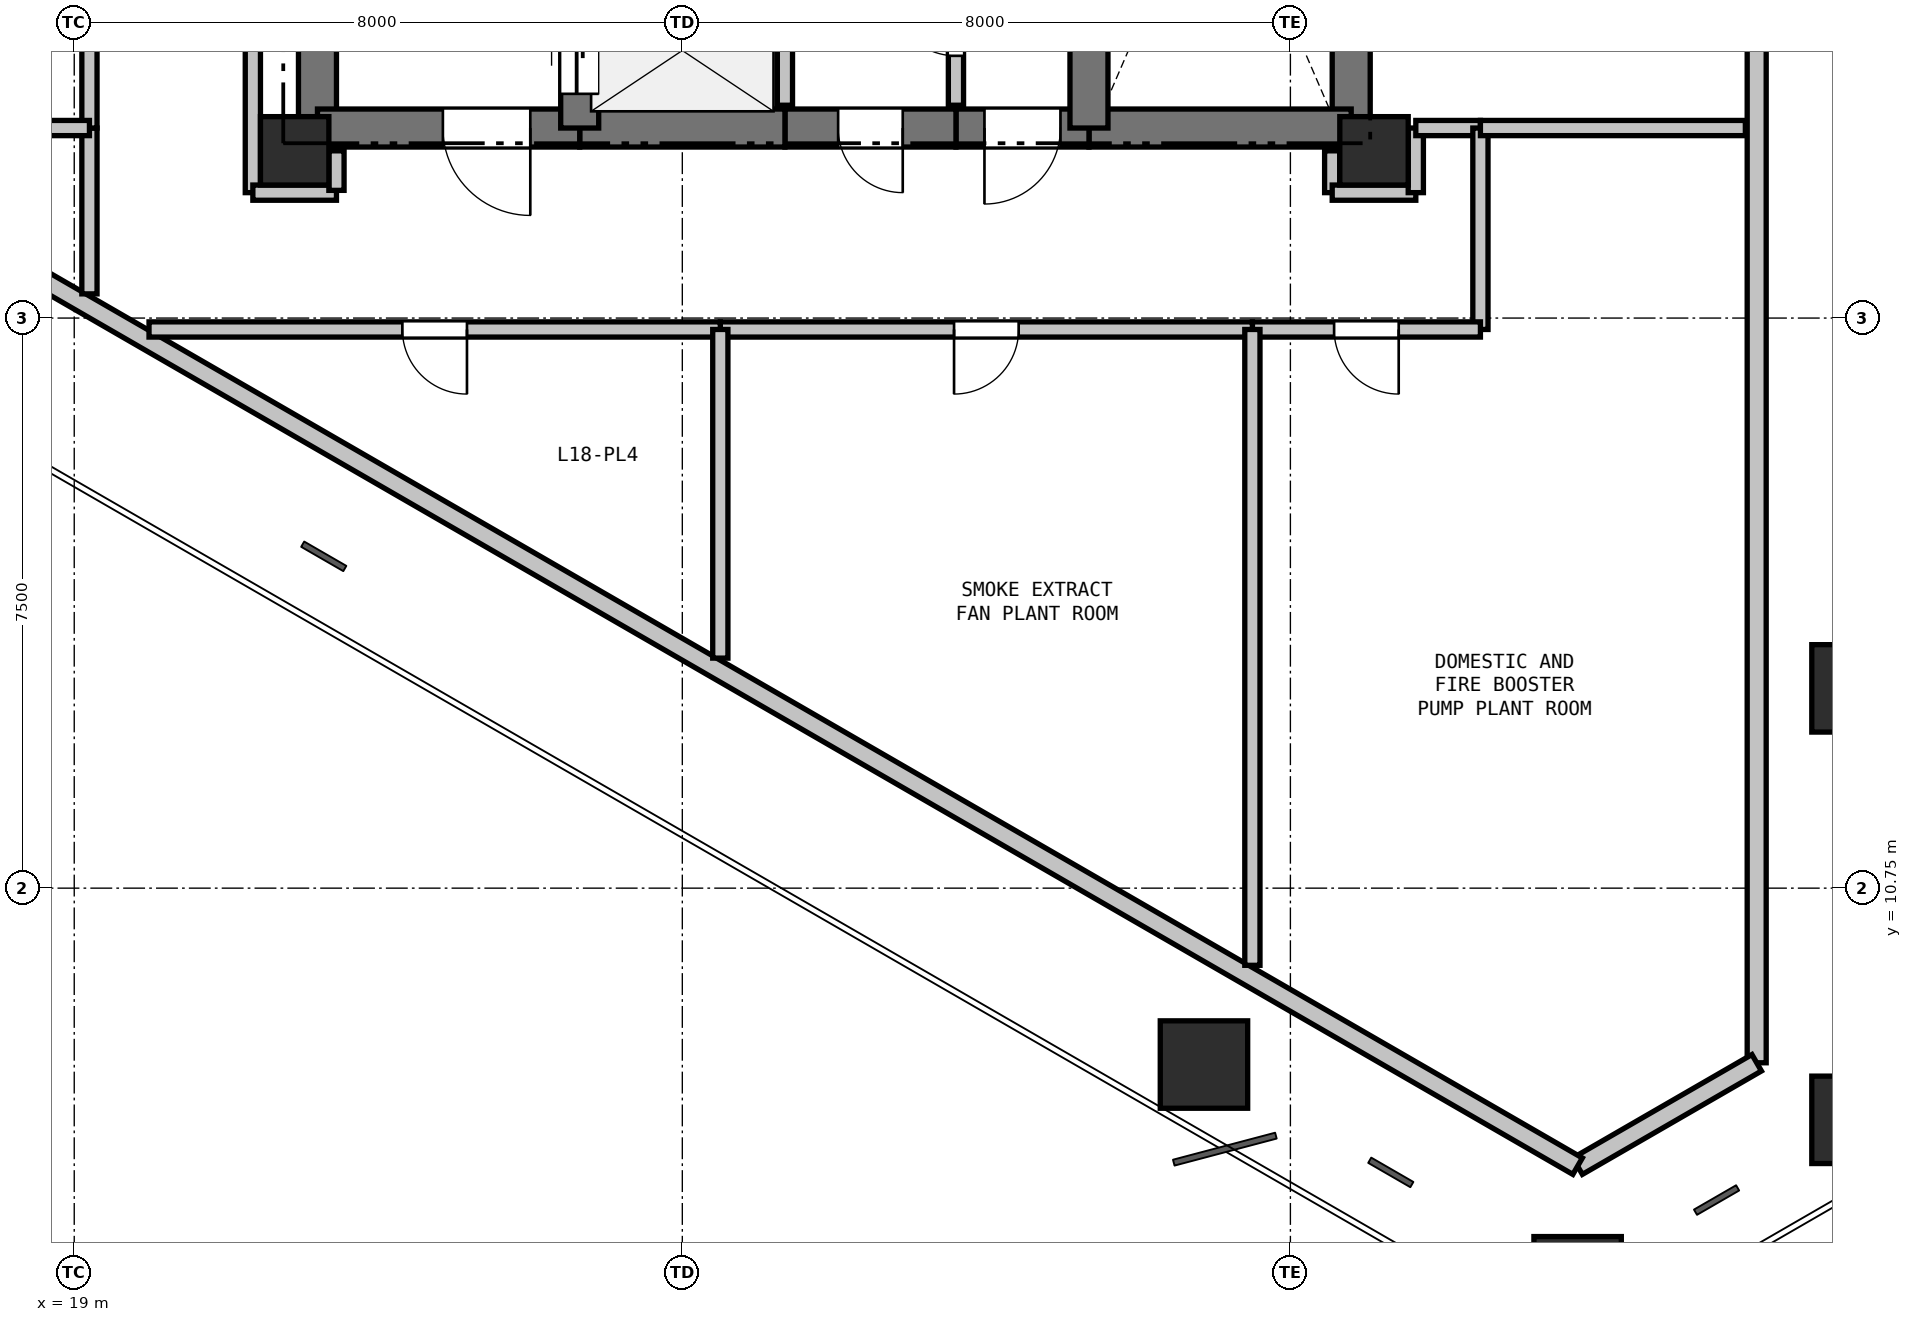
"""IFC4 building model, lengths in metres.
Left out: names, types, materials, properties, quantities, classifications, styles, units other than length and angle.
Written with IfcOpenShell. Run it as: python <this file> out.ifc"""

import sys

from ifc_helpers import new_model, si_unit, direction, frame, frame_2d, origin, origin_2d, place, context, subcontext, project, spatial, rectangle, hollow_rectangle, extrude, element, fill, save


model = new_model("IFC4")
c1 = context("Model", 3, precision=1e-05, world=origin(), true_north=direction((0.0, 1.0)))
c2 = subcontext(c1, "Body", "Model", "MODEL_VIEW")
j1 = project(units=[si_unit("LENGTHUNIT", "METRE"), si_unit("PLANEANGLEUNIT", "RADIAN")], contexts=[c1])
p1 = place(None, origin())
s1 = spatial("IfcSite", under=j1, at=p1, CompositionType="ELEMENT")
p2 = place(p1, origin())
s2 = spatial("IfcBuilding", under=s1, at=p2, CompositionType="ELEMENT")
p3 = place(p2, frame((0.0, 0.0, 66.9)))
s3 = spatial("IfcBuildingStorey", under=s2, at=p3, CompositionType="ELEMENT", Elevation=66.9)
for number, where, z_axis, x_axis in (
    (1, (21.9, 20.45, 0.0), (0.0, 0.0, 1.0), (1.0, 0.0, 0.0)),
    (2, (36.1, 20.45, 0.0), (0.0, 0.0, 1.0), (1.0, 0.0, 0.0)),
):
    element("IfcColumn", number, at=place(p3, frame(where, z_axis=z_axis, x_axis=x_axis)), inside=s3, PredefinedType="COLUMN", context=c2, shape_type="SweptSolid", body=[
        extrude(rectangle(XDim=0.9, YDim=0.9, at=origin_2d()), origin(), (0.0, 0.0, 1.0), 6.6),
    ])
for number, where, z_axis, x_axis in (
    (3, (42.435, 13.378, -0.32), (0.0, 0.0, 1.0), (1.0, 0.0, 0.0)),
    (4, (42.435, 7.702, -0.32), (0.0, 0.0, 1.0), (1.0, 0.0, 0.0)),
    (5, (38.779, 5.591, -0.32), (0.0, 0.0, 1.0), (1.0, 0.0, 0.0)),
    (6, (33.863, 8.429, -0.32), (0.0, 0.0, 1.0), (1.0, 0.0, 0.0)),
):
    element("IfcColumn", number, at=place(p3, frame(where, z_axis=z_axis, x_axis=x_axis)), inside=s3, PredefinedType="COLUMN", context=c2, shape_type="SweptSolid", body=[
        extrude(hollow_rectangle(XDim=1.15, YDim=1.15, WallThickness=0.032, at=origin_2d()), origin(), (0.0, 0.0, 1.0), 6.92),
    ])
p4 = place(p3, frame((41.135, 45.047, 0.0), z_axis=(0.0, 0.0, 1.0), x_axis=(0.0, -1.0, 0.0)))
e7 = element("IfcWall", 7, at=p4, inside=s3, PredefinedType="SOLIDWALL", context=c2, shape_type="SweptSolid", body=[
    extrude(rectangle(XDim=36.595, YDim=0.25, at=frame_2d((18.297, 0.0))), origin(), (0.0, 0.0, 1.0), 5.723),
])
p5 = place(p3, frame((41.135, 8.453, 0.0), z_axis=(0.0, 0.0, 1.0), x_axis=(-0.865980815662, -0.500077220942, 0.0)))
e8 = element("IfcWall", 8, at=p5, inside=s3, PredefinedType="SOLIDWALL", context=c2, shape_type="SweptSolid", body=[
    extrude(rectangle(XDim=2.72, YDim=0.25, at=frame_2d((1.36, 0.0))), origin(), (0.0, 0.0, 1.0), 6.35),
])
p6 = place(p3, frame((38.779, 7.092, 0.0), z_axis=(0.0, 0.0, 1.0), x_axis=(-0.866023716119, 0.500002923111, 0.0)))
e9 = element("IfcWall", 9, at=p6, inside=s3, PredefinedType="SOLIDWALL", context=c2, shape_type="SweptSolid", body=[
    extrude(rectangle(XDim=36.595, YDim=0.25, at=frame_2d((18.297, 0.0))), origin(), (0.0, 0.0, 1.0), 5.723),
])
p7 = place(p3, frame((22.2, 20.75, 0.0), z_axis=(0.0, 0.0, 1.0), x_axis=(0.0, 1.0, 0.0)))
e10 = element("IfcWall", 10, at=p7, inside=s3, PredefinedType="SHEAR", context=c2, shape_type="SweptSolid", body=[
    extrude(rectangle(XDim=4.65, YDim=0.5, at=frame_2d((2.325, 0.0))), origin(), (0.0, 0.0, 1.0), 6.35),
])
p8 = place(p3, frame((35.8, 28.1, 0.0), z_axis=(0.0, 0.0, 1.0), x_axis=(0.0, -1.0, 0.0)))
e11 = element("IfcWall", 11, at=p8, inside=s3, PredefinedType="SHEAR", context=c2, shape_type="SweptSolid", body=[
    extrude(rectangle(XDim=7.35, YDim=0.5, at=frame_2d((3.675, 0.0))), origin(), (0.0, 0.0, 1.0), 6.35),
])
p9 = place(p3, frame((35.8, 20.75, 0.0), z_axis=(0.0, 0.0, 1.0), x_axis=(-1.0, 0.0, 0.0)))
e12 = element("IfcWall", 12, at=p9, inside=s3, PredefinedType="SHEAR", context=c2, shape_type="SweptSolid", body=[
    extrude(rectangle(XDim=3.45, YDim=0.5, at=frame_2d((1.725, 0.0))), origin(), (0.0, 0.0, 1.0), 6.35),
])
p10 = place(p3, frame((32.35, 20.75, 0.0), z_axis=(0.0, 0.0, 1.0), x_axis=(-1.0, 0.0, 0.0)))
e13 = element("IfcWall", 13, at=p10, inside=s3, PredefinedType="SHEAR", context=c2, shape_type="SweptSolid", body=[
    extrude(rectangle(XDim=1.75, YDim=0.5, at=frame_2d((0.875, 0.0))), origin(), (0.0, 0.0, 1.0), 6.35),
])
p11 = place(p10, frame((0.375, 0.0, 0.0)))
e14 = element("IfcOpeningElement", 14, at=p11, cuts=e13, PredefinedType="OPENING", context=c2, shape_type="SweptSolid", body=[
    extrude(rectangle(XDim=1.0, YDim=2.15, at=frame_2d((0.5, 1.075))), frame((0.0, 0.26, 0.0), z_axis=(0.0, -1.0, 0.0), x_axis=(1.0, 0.0, 0.0)), (0.0, 0.0, 1.0), 0.52),
])
p12 = place(p3, frame((30.6, 20.75, 0.0), z_axis=(0.0, 0.0, 1.0), x_axis=(-1.0, 0.0, 0.0)))
e15 = element("IfcWall", 15, at=p12, inside=s3, PredefinedType="SHEAR", context=c2, shape_type="SweptSolid", body=[
    extrude(rectangle(XDim=2.25, YDim=0.5, at=frame_2d((1.125, 0.0))), origin(), (0.0, 0.0, 1.0), 6.35),
])
p13 = place(p12, frame((0.7, 0.0, 0.0)))
e16 = element("IfcOpeningElement", 16, at=p13, cuts=e15, PredefinedType="OPENING", context=c2, shape_type="SweptSolid", body=[
    extrude(rectangle(XDim=0.85, YDim=2.1, at=frame_2d((0.425, 1.05))), frame((0.0, 0.26, 0.0), z_axis=(0.0, -1.0, 0.0), x_axis=(1.0, 0.0, 0.0)), (0.0, 0.0, 1.0), 0.52),
])
p14 = place(p3, frame((28.35, 20.75, 0.0), z_axis=(0.0, 0.0, 1.0), x_axis=(-1.0, 0.0, 0.0)))
e17 = element("IfcWall", 17, at=p14, inside=s3, PredefinedType="SHEAR", context=c2, shape_type="SweptSolid", body=[
    extrude(rectangle(XDim=2.7, YDim=0.5, at=frame_2d((1.35, 0.0))), origin(), (0.0, 0.0, 1.0), 6.35),
])
p15 = place(p3, frame((25.65, 20.75, 0.0), z_axis=(0.0, 0.0, 1.0), x_axis=(-1.0, 0.0, 0.0)))
e18 = element("IfcWall", 18, at=p15, inside=s3, PredefinedType="SHEAR", context=c2, shape_type="SweptSolid", body=[
    extrude(rectangle(XDim=3.45, YDim=0.5, at=frame_2d((1.725, 0.0))), origin(), (0.0, 0.0, 1.0), 6.35),
])
p16 = place(p15, frame((0.65, 0.0, 0.0)))
e19 = element("IfcOpeningElement", 19, at=p16, cuts=e18, PredefinedType="OPENING", context=c2, shape_type="SweptSolid", body=[
    extrude(rectangle(XDim=1.15, YDim=2.15, at=frame_2d((0.575, 1.075))), frame((0.0, 0.26, 0.0), z_axis=(0.0, -1.0, 0.0), x_axis=(1.0, 0.0, 0.0)), (0.0, 0.0, 1.0), 0.52),
])
p17 = place(p3, frame((25.65, 20.75, 0.0), z_axis=(0.0, 0.0, 1.0), x_axis=(0.0, 1.0, 0.0)))
e20 = element("IfcWall", 20, at=p17, inside=s3, PredefinedType="SHEAR", context=c2, shape_type="SweptSolid", body=[
    extrude(rectangle(XDim=2.0, YDim=0.5, at=frame_2d((1.0, 0.0))), origin(), (0.0, 0.0, 1.0), 6.35),
])
p18 = place(p17, frame((0.45, 0.0, 0.0)))
e21 = element("IfcOpeningElement", 21, at=p18, cuts=e20, PredefinedType="OPENING", context=c2, shape_type="SweptSolid", body=[
    extrude(rectangle(XDim=1.1, YDim=2.15, at=frame_2d((0.55, 1.075))), frame((0.0, 0.26, 0.0), z_axis=(0.0, -1.0, 0.0), x_axis=(1.0, 0.0, 0.0)), (0.0, 0.0, 1.0), 0.52),
])
p19 = place(p3, frame((32.35, 20.75, 0.0), z_axis=(0.0, 0.0, 1.0), x_axis=(0.0, 1.0, 0.0)))
e22 = element("IfcWall", 22, at=p19, inside=s3, PredefinedType="SHEAR", context=c2, shape_type="SweptSolid", body=[
    extrude(rectangle(XDim=4.8, YDim=0.5, at=frame_2d((2.4, 0.0))), origin(), (0.0, 0.0, 1.0), 6.35),
])
p20 = place(p3, frame((28.35, 23.2, 0.0), z_axis=(0.0, 0.0, 1.0), x_axis=(0.0, -1.0, 0.0)))
e23 = element("IfcWall", 23, at=p20, inside=s3, PredefinedType="PARTITIONING", context=c2, shape_type="SweptSolid", body=[
    extrude(rectangle(XDim=2.15, YDim=0.2, at=frame_2d((1.075, 0.0))), origin(), (0.0, 0.0, 1.0), 6.35),
])
p21 = place(p3, frame((30.6, 21.05, 0.0), z_axis=(0.0, 0.0, 1.0), x_axis=(0.0, 1.0, 0.0)))
e24 = element("IfcWall", 24, at=p21, inside=s3, PredefinedType="PARTITIONING", context=c2, shape_type="SweptSolid", body=[
    extrude(rectangle(XDim=2.15, YDim=0.2, at=frame_2d((1.075, 0.0))), origin(), (0.0, 0.0, 1.0), 6.35),
])
p22 = place(p21, frame((0.65, 0.0, 0.0)))
e25 = element("IfcOpeningElement", 25, at=p22, cuts=e24, PredefinedType="OPENING", context=c2, shape_type="SweptSolid", body=[
    extrude(rectangle(XDim=0.85, YDim=2.1, at=frame_2d((0.425, 1.05))), frame((0.0, 0.11, 0.0), z_axis=(0.0, -1.0, 0.0), x_axis=(1.0, 0.0, 0.0)), (0.0, 0.0, 1.0), 0.22),
])
p23 = place(p3, frame((21.35, 33.6, 0.0), z_axis=(0.0, 0.0, 1.0), x_axis=(0.0, -1.0, 0.0)))
e26 = element("IfcWall", 26, at=p23, inside=s3, PredefinedType="PARTITIONING", context=c2, shape_type="SweptSolid", body=[
    extrude(rectangle(XDim=13.7, YDim=0.2, at=frame_2d((6.85, 0.0))), origin(), (0.0, 0.0, 1.0), 5.723),
])
p24 = place(p3, frame((21.35, 19.9, 0.0), z_axis=(0.0, 0.0, 1.0), x_axis=(1.0, 0.0, 0.0)))
e27 = element("IfcWall", 27, at=p24, inside=s3, PredefinedType="PARTITIONING", context=c2, shape_type="SweptSolid", body=[
    extrude(rectangle(XDim=1.1, YDim=0.2, at=frame_2d((0.55, 0.0))), origin(), (0.0, 0.0, 1.0), 5.723),
])
p25 = place(p3, frame((22.45, 19.93, 0.0), z_axis=(0.0, 0.0, 1.0), x_axis=(0.0, 1.0, 0.0)))
e28 = element("IfcWall", 28, at=p25, inside=s3, PredefinedType="PARTITIONING", context=c2, shape_type="SweptSolid", body=[
    extrude(rectangle(XDim=0.52, YDim=0.2, at=frame_2d((0.26, 0.0))), origin(), (0.0, 0.0, 1.0), 5.723),
])
p26 = place(p3, frame((35.55, 20.45, 0.0), z_axis=(0.0, 0.0, 1.0), x_axis=(0.0, -1.0, 0.0)))
e29 = element("IfcWall", 29, at=p26, inside=s3, PredefinedType="PARTITIONING", context=c2, shape_type="SweptSolid", body=[
    extrude(rectangle(XDim=0.55, YDim=0.2, at=frame_2d((0.275, 0.0))), origin(), (0.0, 0.0, 1.0), 5.798),
])
p27 = place(p3, frame((35.55, 19.9, 0.0), z_axis=(0.0, 0.0, 1.0), x_axis=(1.0, 0.0, 0.0)))
e30 = element("IfcWall", 30, at=p27, inside=s3, PredefinedType="PARTITIONING", context=c2, shape_type="SweptSolid", body=[
    extrude(rectangle(XDim=1.1, YDim=0.2, at=frame_2d((0.55, 0.0))), origin(), (0.0, 0.0, 1.0), 5.723),
])
for number, where, z_axis, x_axis in (
    (31, (36.65, 19.9, 0.0), (0.0, 0.0, 1.0), (0.0, 1.0, 0.0)),
    (32, (36.65, 20.75, 0.0), (0.0, 0.0, 1.0), (1.0, 0.0, 0.0)),
):
    element("IfcWall", number, at=place(p3, frame(where, z_axis=z_axis, x_axis=x_axis)), inside=s3, PredefinedType="PARTITIONING", context=c2, shape_type="SweptSolid", body=[
        extrude(rectangle(XDim=0.85, YDim=0.2, at=frame_2d((0.425, 0.0))), origin(), (0.0, 0.0, 1.0), 6.35),
    ])
p28 = place(p3, frame((37.5, 20.75, 0.0), z_axis=(0.0, 0.0, 1.0), x_axis=(0.0, -1.0, 0.0)))
e33 = element("IfcWall", 33, at=p28, inside=s3, PredefinedType="PARTITIONING", context=c2, shape_type="SweptSolid", body=[
    extrude(rectangle(XDim=2.65, YDim=0.2, at=frame_2d((1.325, 0.0))), origin(), (0.0, 0.0, 1.0), 6.35),
])
p29 = place(p3, frame((37.5, 18.1, 0.0), z_axis=(0.0, 0.0, 1.0), x_axis=(-1.0, 0.0, 0.0)))
e34 = element("IfcWall", 34, at=p29, inside=s3, PredefinedType="PARTITIONING", context=c2, shape_type="SweptSolid", body=[
    extrude(rectangle(XDim=3.0, YDim=0.2, at=frame_2d((1.5, 0.0))), origin(), (0.0, 0.0, 1.0), 5.723),
])
p30 = place(p29, frame((1.075, 0.0, 0.0)))
e35 = element("IfcOpeningElement", 35, at=p30, cuts=e34, PredefinedType="OPENING", context=c2, shape_type="SweptSolid", body=[
    extrude(rectangle(XDim=0.85, YDim=2.1, at=frame_2d((0.425, 1.05))), frame((0.0, 0.11, 0.0), z_axis=(0.0, -1.0, 0.0), x_axis=(1.0, 0.0, 0.0)), (0.0, 0.0, 1.0), 0.22),
])
p31 = place(p3, frame((34.5, 18.1, 0.0), z_axis=(0.0, 0.0, 1.0), x_axis=(-1.0, 0.0, 0.0)))
e36 = element("IfcWall", 36, at=p31, inside=s3, PredefinedType="PARTITIONING", context=c2, shape_type="SweptSolid", body=[
    extrude(rectangle(XDim=7.0, YDim=0.2, at=frame_2d((3.5, 0.0))), origin(), (0.0, 0.0, 1.0), 6.35),
])
p32 = place(p31, frame((3.075, 0.0, 0.0)))
e37 = element("IfcOpeningElement", 37, at=p32, cuts=e36, PredefinedType="OPENING", context=c2, shape_type="SweptSolid", body=[
    extrude(rectangle(XDim=0.85, YDim=2.1, at=frame_2d((0.425, 1.05))), frame((0.0, 0.11, 0.0), z_axis=(0.0, -1.0, 0.0), x_axis=(1.0, 0.0, 0.0)), (0.0, 0.0, 1.0), 0.22),
])
p33 = place(p3, frame((27.5, 18.1, 0.0), z_axis=(0.0, 0.0, 1.0), x_axis=(-1.0, 0.0, 0.0)))
e38 = element("IfcWall", 38, at=p33, inside=s3, PredefinedType="PARTITIONING", context=c2, shape_type="SweptSolid", body=[
    extrude(rectangle(XDim=7.516, YDim=0.2, at=frame_2d((3.758, 0.0))), origin(), (0.0, 0.0, 1.0), 5.723),
])
p34 = place(p33, frame((3.333, 0.0, 0.0)))
e39 = element("IfcOpeningElement", 39, at=p34, cuts=e38, PredefinedType="OPENING", context=c2, shape_type="SweptSolid", body=[
    extrude(rectangle(XDim=0.85, YDim=2.1, at=frame_2d((0.425, 1.05))), frame((0.0, 0.11, 0.0), z_axis=(0.0, -1.0, 0.0), x_axis=(1.0, 0.0, 0.0)), (0.0, 0.0, 1.0), 0.22),
])
p35 = place(p3, frame((19.2, 18.568, 0.0), z_axis=(0.0, 0.0, 1.0), x_axis=(0.0, 1.0, 0.0)))
e40 = element("IfcWall", 40, at=p35, inside=s3, PredefinedType="PARTITIONING", context=c2, shape_type="SweptSolid", body=[
    extrude(rectangle(XDim=2.182, YDim=0.2, at=frame_2d((1.091, 0.0))), origin(), (0.0, 0.0, 1.0), 6.35),
])
p36 = place(p3, frame((19.2, 20.75, 0.0), z_axis=(0.0, 0.0, 1.0), x_axis=(0.0, 1.0, 0.0)))
e41 = element("IfcWall", 41, at=p36, inside=s3, PredefinedType="PARTITIONING", context=c2, shape_type="SweptSolid", body=[
    extrude(rectangle(XDim=12.0, YDim=0.2, at=frame_2d((6.0, 0.0))), origin(), (0.0, 0.0, 1.0), 5.723),
])
p37 = place(p36, frame((5.575, 0.0, 0.0)))
e42 = element("IfcOpeningElement", 42, at=p37, cuts=e41, PredefinedType="OPENING", context=c2, shape_type="SweptSolid", body=[
    extrude(rectangle(XDim=0.85, YDim=2.1, at=frame_2d((0.425, 1.05))), frame((0.0, 0.11, 0.0), z_axis=(0.0, -1.0, 0.0), x_axis=(1.0, 0.0, 0.0)), (0.0, 0.0, 1.0), 0.22),
])
p38 = place(p3, frame((19.2, 20.75, 0.0), z_axis=(0.0, 0.0, 1.0), x_axis=(-1.0, 0.0, 0.0)))
e43 = element("IfcWall", 43, at=p38, inside=s3, PredefinedType="PARTITIONING", context=c2, shape_type="SweptSolid", body=[
    extrude(rectangle(XDim=3.806, YDim=0.2, at=frame_2d((1.903, 0.0))), origin(), (0.0, 0.0, 1.0), 6.35),
])
p39 = place(p3, frame((27.5, 18.1, 0.0), z_axis=(0.0, 0.0, 1.0), x_axis=(0.0, -1.0, 0.0)))
e44 = element("IfcWall", 44, at=p39, inside=s3, PredefinedType="PARTITIONING", context=c2, shape_type="SweptSolid", body=[
    extrude(rectangle(XDim=4.324, YDim=0.2, at=frame_2d((2.162, 0.0))), origin(), (0.0, 0.0, 1.0), 5.723),
])
p40 = place(p3, frame((34.5, 18.1, 0.0), z_axis=(0.0, 0.0, 1.0), x_axis=(0.0, -1.0, 0.0)))
e45 = element("IfcWall", 45, at=p40, inside=s3, PredefinedType="PARTITIONING", context=c2, shape_type="SweptSolid", body=[
    extrude(rectangle(XDim=8.365, YDim=0.2, at=frame_2d((4.183, 0.0))), origin(), (0.0, 0.0, 1.0), 6.35),
])
p41 = place(p3, frame((37.5, 20.75, 0.0), z_axis=(0.0, 0.0, 1.0), x_axis=(1.0, 0.0, 0.0)))
e46 = element("IfcWall", 46, at=p41, inside=s3, PredefinedType="PARTITIONING", context=c2, shape_type="SweptSolid", body=[
    extrude(rectangle(XDim=3.486, YDim=0.2, at=frame_2d((1.743, 0.0))), origin(), (0.0, 0.0, 1.0), 6.35),
])
p42 = place(p11, origin())
e47 = element("IfcDoor", 47, at=p42, inside=s3, OperationType="SINGLE_SWING_RIGHT", PredefinedType="DOOR", context=c2, shape_type="SweptSolid", body=[
    extrude(rectangle(XDim=1.0, YDim=2.15, at=frame_2d((0.5, 1.075))), frame((0.0, 0.025, 0.0), z_axis=(0.0, -1.0, 0.0), x_axis=(1.0, 0.0, 0.0)), (0.0, 0.0, 1.0), 0.05),
])
fill(e14, e47)
p43 = place(p18, origin())
e48 = element("IfcDoor", 48, at=p43, inside=s3, OperationType="SLIDING_TO_LEFT", PredefinedType="DOOR", context=c2, shape_type="SweptSolid", body=[
    extrude(rectangle(XDim=1.1, YDim=2.15, at=frame_2d((0.55, 1.075))), frame((0.0, 0.025, 0.0), z_axis=(0.0, -1.0, 0.0), x_axis=(1.0, 0.0, 0.0)), (0.0, 0.0, 1.0), 0.05),
])
fill(e21, e48)
p44 = place(p16, origin())
e49 = element("IfcDoor", 49, at=p44, inside=s3, OperationType="SINGLE_SWING_LEFT", PredefinedType="DOOR", context=c2, shape_type="SweptSolid", body=[
    extrude(rectangle(XDim=1.15, YDim=2.15, at=frame_2d((0.575, 1.075))), frame((0.0, 0.025, 0.0), z_axis=(0.0, -1.0, 0.0), x_axis=(1.0, 0.0, 0.0)), (0.0, 0.0, 1.0), 0.05),
])
fill(e19, e49)
p45 = place(p22, origin())
e50 = element("IfcDoor", 50, at=p45, inside=s3, OperationType="SINGLE_SWING_RIGHT", PredefinedType="DOOR", context=c2, shape_type="SweptSolid", body=[
    extrude(rectangle(XDim=0.85, YDim=2.1, at=frame_2d((0.425, 1.05))), frame((0.0, 0.025, 0.0), z_axis=(0.0, -1.0, 0.0), x_axis=(1.0, 0.0, 0.0)), (0.0, 0.0, 1.0), 0.05),
])
fill(e25, e50)
p46 = place(p13, origin())
e51 = element("IfcDoor", 51, at=p46, inside=s3, OperationType="SINGLE_SWING_LEFT", PredefinedType="DOOR", context=c2, shape_type="SweptSolid", body=[
    extrude(rectangle(XDim=0.85, YDim=2.1, at=frame_2d((0.425, 1.05))), frame((0.0, 0.025, 0.0), z_axis=(0.0, -1.0, 0.0), x_axis=(1.0, 0.0, 0.0)), (0.0, 0.0, 1.0), 0.05),
])
fill(e16, e51)
p47 = place(p34, origin())
e52 = element("IfcDoor", 52, at=p47, inside=s3, OperationType="SINGLE_SWING_LEFT", PredefinedType="DOOR", context=c2, shape_type="SweptSolid", body=[
    extrude(rectangle(XDim=0.85, YDim=2.1, at=frame_2d((0.425, 1.05))), frame((0.0, 0.025, 0.0), z_axis=(0.0, -1.0, 0.0), x_axis=(1.0, 0.0, 0.0)), (0.0, 0.0, 1.0), 0.05),
])
fill(e39, e52)
p48 = place(p32, origin())
e53 = element("IfcDoor", 53, at=p48, inside=s3, OperationType="SINGLE_SWING_RIGHT", PredefinedType="DOOR", context=c2, shape_type="SweptSolid", body=[
    extrude(rectangle(XDim=0.85, YDim=2.1, at=frame_2d((0.425, 1.05))), frame((0.0, 0.025, 0.0), z_axis=(0.0, -1.0, 0.0), x_axis=(1.0, 0.0, 0.0)), (0.0, 0.0, 1.0), 0.05),
])
fill(e37, e53)
p49 = place(p30, origin())
e54 = element("IfcDoor", 54, at=p49, inside=s3, OperationType="SINGLE_SWING_LEFT", PredefinedType="DOOR", context=c2, shape_type="SweptSolid", body=[
    extrude(rectangle(XDim=0.85, YDim=2.1, at=frame_2d((0.425, 1.05))), frame((0.0, 0.025, 0.0), z_axis=(0.0, -1.0, 0.0), x_axis=(1.0, 0.0, 0.0)), (0.0, 0.0, 1.0), 0.05),
])
fill(e35, e54)
save(model, sys.argv[1])
